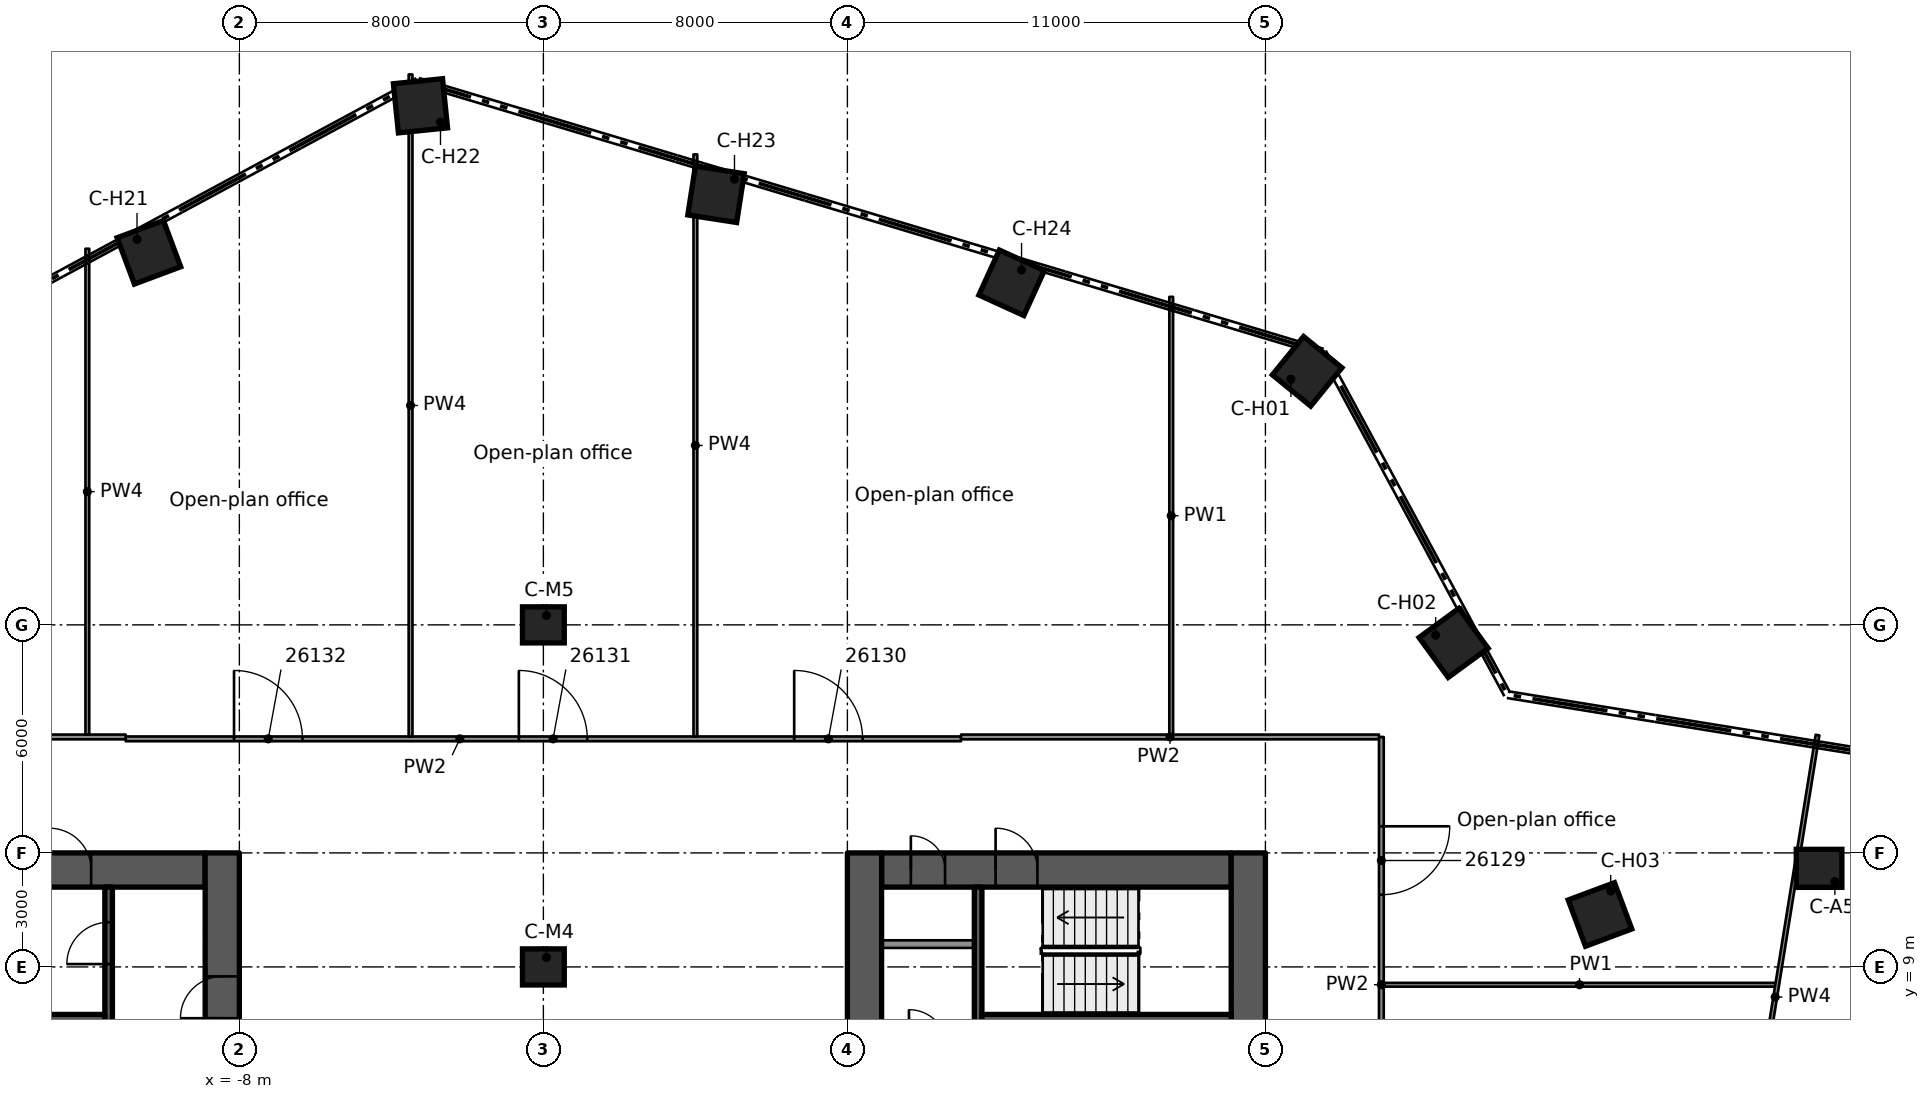
"""IFC4 building model, lengths in metres.
Left out: names, types, materials, properties, quantities, classifications, styles, units other than length and angle.
Written with IfcOpenShell. Run it as: python <this file> out.ifc"""

import sys

from ifc_helpers import new_model, si_unit, direction, frame, frame_2d, origin, origin_2d, place, context, subcontext, project, spatial, rectangle, extrude, element, fill, save


model = new_model("IFC4")
c1 = context("Model", 3, precision=1e-05, world=origin(), true_north=direction((0.0, 1.0)))
c2 = subcontext(c1, "Body", "Model", "MODEL_VIEW")
j1 = project(units=[si_unit("LENGTHUNIT", "METRE"), si_unit("PLANEANGLEUNIT", "RADIAN")], contexts=[c1])
p1 = place(None, origin())
s1 = spatial("IfcSite", under=j1, at=p1, CompositionType="ELEMENT")
p2 = place(p1, origin())
s2 = spatial("IfcBuilding", under=s1, at=p2, CompositionType="ELEMENT")
p3 = place(p2, frame((0.0, 0.0, 134.2)))
s3 = spatial("IfcBuildingStorey", under=s2, at=p3, CompositionType="ELEMENT", Elevation=134.2)
p4 = place(p3, frame((-18.1, 11.55, 0.0), z_axis=(0.0, 0.0, 1.0), x_axis=(1.0, 0.0, 0.0)))
e1 = element("IfcWall", 1, at=p4, inside=s3, PredefinedType="SHEAR", context=c2, shape_type="SweptSolid", body=[
    extrude(rectangle(XDim=9.2, YDim=0.9, at=frame_2d((4.6, 0.0))), origin(), (0.0, 0.0, 1.0), 3.5),
])
p5 = place(p4, frame((5.1, 0.0, 0.0)))
e2 = element("IfcOpeningElement", 2, at=p5, cuts=e1, PredefinedType="OPENING", context=c2, shape_type="SweptSolid", body=[
    extrude(rectangle(XDim=1.1, YDim=2.1, at=frame_2d((0.55, 1.05))), frame((0.0, 0.46, 0.0), z_axis=(0.0, -1.0, 0.0), x_axis=(1.0, 0.0, 0.0)), (0.0, 0.0, 1.0), 0.92),
])
p6 = place(p3, frame((-8.45, -12.0, 0.0), z_axis=(0.0, 0.0, 1.0), x_axis=(0.0, 1.0, 0.0)))
e3 = element("IfcWall", 3, at=p6, inside=s3, PredefinedType="SHEAR", context=c2, shape_type="SweptSolid", body=[
    extrude(rectangle(XDim=24.0, YDim=0.9, at=frame_2d((12.0, 0.0))), origin(), (0.0, 0.0, 1.0), 3.5),
])
p7 = place(p6, frame((9.6, 0.0, 0.0)))
e4 = element("IfcOpeningElement", 4, at=p7, cuts=e3, PredefinedType="OPENING", context=c2, shape_type="SweptSolid", body=[
    extrude(rectangle(XDim=1.8, YDim=2.1, at=frame_2d((0.9, 1.05))), frame((0.0, 0.46, 0.0), z_axis=(0.0, -1.0, 0.0), x_axis=(1.0, 0.0, 0.0)), (0.0, 0.0, 1.0), 0.92),
])
p8 = place(p6, frame((19.65, 0.0, 0.0)))
e5 = element("IfcOpeningElement", 5, at=p8, cuts=e3, PredefinedType="OPENING", context=c2, shape_type="SweptSolid", body=[
    extrude(rectangle(XDim=1.1, YDim=2.1, at=frame_2d((0.55, 1.05))), frame((0.0, 0.46, 0.0), z_axis=(0.0, -1.0, 0.0), x_axis=(1.0, 0.0, 0.0)), (0.0, 0.0, 1.0), 0.92),
])
p9 = place(p3, frame((8.9, 11.55, 0.0), z_axis=(0.0, 0.0, 1.0), x_axis=(1.0, 0.0, 0.0)))
e6 = element("IfcWall", 6, at=p9, inside=s3, PredefinedType="SHEAR", context=c2, shape_type="SweptSolid", body=[
    extrude(rectangle(XDim=9.2, YDim=0.9, at=frame_2d((4.6, 0.0))), origin(), (0.0, 0.0, 1.0), 3.5),
])
p10 = place(p9, frame((3.0, 0.0, 0.0)))
e7 = element("IfcOpeningElement", 7, at=p10, cuts=e6, PredefinedType="OPENING", context=c2, shape_type="SweptSolid", body=[
    extrude(rectangle(XDim=1.1, YDim=2.1, at=frame_2d((0.55, 1.05))), frame((0.0, 0.46, 0.0), z_axis=(0.0, -1.0, 0.0), x_axis=(1.0, 0.0, 0.0)), (0.0, 0.0, 1.0), 0.92),
])
p11 = place(p9, frame((0.77, 0.0, 0.0)))
e8 = element("IfcOpeningElement", 8, at=p11, cuts=e6, PredefinedType="OPENING", context=c2, shape_type="SweptSolid", body=[
    extrude(rectangle(XDim=0.9, YDim=2.1, at=frame_2d((0.45, 1.05))), frame((0.0, 0.46, 0.0), z_axis=(0.0, -1.0, 0.0), x_axis=(1.0, 0.0, 0.0)), (0.0, 0.0, 1.0), 0.92),
])
p12 = place(p3, frame((8.45, -12.0, 0.0), z_axis=(0.0, 0.0, 1.0), x_axis=(0.0, 1.0, 0.0)))
e9 = element("IfcWall", 9, at=p12, inside=s3, PredefinedType="SHEAR", context=c2, shape_type="SweptSolid", body=[
    extrude(rectangle(XDim=24.0, YDim=0.9, at=frame_2d((12.0, 0.0))), origin(), (0.0, 0.0, 1.0), 3.5),
])
p13 = place(p12, frame((12.6, 0.0, 0.0)))
e10 = element("IfcOpeningElement", 10, at=p13, cuts=e9, PredefinedType="OPENING", context=c2, shape_type="SweptSolid", body=[
    extrude(rectangle(XDim=1.8, YDim=2.1, at=frame_2d((0.9, 1.05))), frame((0.0, 0.46, 0.0), z_axis=(0.0, -1.0, 0.0), x_axis=(1.0, 0.0, 0.0)), (0.0, 0.0, 1.0), 0.92),
])
p14 = place(p12, frame((3.25, 0.0, 0.0)))
e11 = element("IfcOpeningElement", 11, at=p14, cuts=e9, PredefinedType="OPENING", context=c2, shape_type="SweptSolid", body=[
    extrude(rectangle(XDim=1.1, YDim=2.1, at=frame_2d((0.55, 1.05))), frame((0.0, 0.46, 0.0), z_axis=(0.0, -1.0, 0.0), x_axis=(1.0, 0.0, 0.0)), (0.0, 0.0, 1.0), 0.92),
])
p15 = place(p3, frame((18.55, -12.0, 0.0), z_axis=(0.0, 0.0, 1.0), x_axis=(0.0, 1.0, 0.0)))
e12 = element("IfcWall", 12, at=p15, inside=s3, PredefinedType="SHEAR", context=c2, shape_type="SweptSolid", body=[
    extrude(rectangle(XDim=24.0, YDim=0.9, at=frame_2d((12.0, 0.0))), origin(), (0.0, 0.0, 1.0), 3.5),
])
p16 = place(p15, frame((12.1, 0.0, 0.0)))
e13 = element("IfcOpeningElement", 13, at=p16, cuts=e12, PredefinedType="OPENING", context=c2, shape_type="SweptSolid", body=[
    extrude(rectangle(XDim=1.8, YDim=2.1, at=frame_2d((0.9, 1.05))), frame((0.0, 0.46, 0.0), z_axis=(0.0, -1.0, 0.0), x_axis=(1.0, 0.0, 0.0)), (0.0, 0.0, 1.0), 0.92),
])
p17 = place(p3, frame((33.569, 11.594, 0.0), z_axis=(0.0, 0.0, 1.0), x_axis=(1.0, 0.0, 0.0)))
e14 = element("IfcColumn", 14, at=p17, inside=s3, PredefinedType="COLUMN", context=c2, shape_type="SweptSolid", body=[
    extrude(rectangle(XDim=1.2, YDim=1.0, at=origin_2d()), origin(), (0.0, 0.0, 1.0), 3.5),
])
for number, where, z_axis, x_axis in (
    (15, (20.098, 24.672, 0.0), (0.0, 0.0, 1.0), (0.632, 0.775, 0.0)),
    (16, (23.951, 17.526, 0.0), (0.0, 0.0, 1.0), (0.807, 0.591, 0.0)),
    (17, (27.804, 10.38, 0.0), (0.0, 0.0, 1.0), (0.937, 0.35, 0.0)),
    (18, (-10.38, 27.804, 0.0), (0.0, 0.0, 1.0), (-0.35, 0.937, 0.0)),
    (19, (-3.234, 31.658, 0.0), (0.0, 0.0, 1.0), (-0.102, 0.995, 0.0)),
    (20, (4.543, 29.329, 0.0), (0.0, 0.0, 1.0), (0.153, 0.988, 0.0)),
    (21, (12.321, 27.001, 0.0), (0.0, 0.0, 1.0), (0.415, 0.91, 0.0)),
):
    element("IfcColumn", number, at=place(p3, frame(where, z_axis=z_axis, x_axis=x_axis)), inside=s3, PredefinedType="COLUMN", context=c2, shape_type="SweptSolid", body=[
        extrude(rectangle(XDim=1.3, YDim=1.3, at=origin_2d()), origin(), (0.0, 0.0, 1.0), 3.5),
    ])
for number, where, z_axis, x_axis in (
    (22, (0.0, 9.0, 0.0), (0.0, 0.0, 1.0), (1.0, 0.0, 0.0)),
    (23, (0.0, 18.0, 0.0), (0.0, 0.0, 1.0), (1.0, 0.0, 0.0)),
):
    element("IfcColumn", number, at=place(p3, frame(where, z_axis=z_axis, x_axis=x_axis)), inside=s3, PredefinedType="COLUMN", context=c2, shape_type="SweptSolid", body=[
        extrude(rectangle(XDim=1.1, YDim=0.95, at=origin_2d()), origin(), (0.0, 0.0, 1.0), 3.5),
    ])
p18 = place(p3, frame((-11.44, 6.975, 0.0), z_axis=(0.0, 0.0, 1.0), x_axis=(0.0, 1.0, 0.0)))
e24 = element("IfcWall", 24, at=p18, inside=s3, PredefinedType="SOLIDWALL", context=c2, shape_type="SweptSolid", body=[
    extrude(rectangle(XDim=4.125, YDim=0.2, at=frame_2d((2.062, 0.0))), origin(), (0.0, 0.0, 1.0), 3.09),
])
p19 = place(p18, frame((2.1, 0.0, 0.0)))
e25 = element("IfcOpeningElement", 25, at=p19, cuts=e24, PredefinedType="OPENING", context=c2, shape_type="SweptSolid", body=[
    extrude(rectangle(XDim=1.1, YDim=2.1, at=frame_2d((0.55, 1.05))), frame((0.0, 0.11, 0.0), z_axis=(0.0, -1.0, 0.0), x_axis=(1.0, 0.0, 0.0)), (0.0, 0.0, 1.0), 0.22),
])
p20 = place(p3, frame((-11.54, 7.65, 0.0), z_axis=(0.0, 0.0, 1.0), x_axis=(-1.0, 0.0, 0.0)))
e26 = element("IfcWall", 26, at=p20, inside=s3, PredefinedType="SOLIDWALL", context=c2, shape_type="SweptSolid", body=[
    extrude(rectangle(XDim=6.56, YDim=0.2, at=frame_2d((3.28, 0.0))), origin(), (0.0, 0.0, 1.0), 3.09),
])
p21 = place(p3, frame((11.44, 11.1, 0.0), z_axis=(0.0, 0.0, 1.0), x_axis=(0.0, -1.0, 0.0)))
e27 = element("IfcWall", 27, at=p21, inside=s3, PredefinedType="SOLIDWALL", context=c2, shape_type="SweptSolid", body=[
    extrude(rectangle(XDim=4.125, YDim=0.2, at=frame_2d((2.062, 0.0))), origin(), (0.0, 0.0, 1.0), 3.09),
])
p22 = place(p3, frame((11.54, 7.65, 0.0), z_axis=(0.0, 0.0, 1.0), x_axis=(1.0, 0.0, 0.0)))
e28 = element("IfcWall", 28, at=p22, inside=s3, PredefinedType="SOLIDWALL", context=c2, shape_type="SweptSolid", body=[
    extrude(rectangle(XDim=6.56, YDim=0.2, at=frame_2d((3.28, 0.0))), origin(), (0.0, 0.0, 1.0), 3.09),
])
p23 = place(p3, frame((8.9, 9.6, 0.0), z_axis=(0.0, 0.0, 1.0), x_axis=(1.0, 0.0, 0.0)))
e29 = element("IfcWall", 29, at=p23, inside=s3, PredefinedType="PARTITIONING", context=c2, shape_type="SweptSolid", body=[
    extrude(rectangle(XDim=2.44, YDim=0.2, at=frame_2d((1.22, 0.0))), origin(), (0.0, 0.0, 1.0), 3.09),
])
p24 = place(p3, frame((22.113, 8.531, 0.0), z_axis=(0.0, 0.0, 1.0), x_axis=(1.0, 0.0, 0.0)))
e30 = element("IfcWall", 30, at=p24, inside=s3, PredefinedType="PARTITIONING", context=c2, shape_type="SweptSolid", body=[
    extrude(rectangle(XDim=10.304, YDim=0.1, at=frame_2d((5.152, 0.0))), origin(), (0.0, 0.0, 1.0), 3.03),
])
p25 = place(p3, frame((-10.99, 15.001, 0.0), z_axis=(0.0, 0.0, 1.0), x_axis=(1.0, 0.0, 0.0)))
e31 = element("IfcWall", 31, at=p25, inside=s3, PredefinedType="PARTITIONING", context=c2, shape_type="SweptSolid", body=[
    extrude(rectangle(XDim=21.98, YDim=0.125, at=frame_2d((10.99, 0.0))), origin(), (0.0, 0.0, 1.0), 3.03),
])
p26 = place(p25, frame((17.59, 0.0, 0.0)))
e32 = element("IfcOpeningElement", 32, at=p26, cuts=e31, PredefinedType="OPENING", context=c2, shape_type="SweptSolid", body=[
    extrude(rectangle(XDim=1.8, YDim=2.1, at=frame_2d((0.9, 1.05))), frame((0.0, 0.073, 0.0), z_axis=(0.0, -1.0, 0.0), x_axis=(1.0, 0.0, 0.0)), (0.0, 0.0, 1.0), 0.145),
])
p27 = place(p25, frame((10.345, 0.0, 0.0)))
e33 = element("IfcOpeningElement", 33, at=p27, cuts=e31, PredefinedType="OPENING", context=c2, shape_type="SweptSolid", body=[
    extrude(rectangle(XDim=1.8, YDim=2.1, at=frame_2d((0.9, 1.05))), frame((0.0, 0.073, 0.0), z_axis=(0.0, -1.0, 0.0), x_axis=(1.0, 0.0, 0.0)), (0.0, 0.0, 1.0), 0.145),
])
p28 = place(p25, frame((2.85, 0.0, 0.0)))
e34 = element("IfcOpeningElement", 34, at=p28, cuts=e31, PredefinedType="OPENING", context=c2, shape_type="SweptSolid", body=[
    extrude(rectangle(XDim=1.8, YDim=2.1, at=frame_2d((0.9, 1.05))), frame((0.0, 0.073, 0.0), z_axis=(0.0, -1.0, 0.0), x_axis=(1.0, 0.0, 0.0)), (0.0, 0.0, 1.0), 0.145),
])
for number, where, z_axis, x_axis in (
    (35, (-21.988, 15.051, 0.0), (0.0, 0.0, 1.0), (1.0, 0.0, 0.0)),
    (36, (10.991, 15.051, 0.0), (0.0, 0.0, 1.0), (1.0, 0.0, 0.0)),
):
    element("IfcWall", number, at=place(p3, frame(where, z_axis=z_axis, x_axis=x_axis)), inside=s3, PredefinedType="PARTITIONING", context=c2, shape_type="SweptSolid", body=[
        extrude(rectangle(XDim=10.997, YDim=0.125, at=frame_2d((5.499, 0.0))), origin(), (0.0, 0.0, 1.0), 3.03),
    ])
p29 = place(p3, frame((31.302, 1.314, 0.0), z_axis=(0.0, 0.0, 1.0), x_axis=(0.159396223654, 0.987214689865, 0.0)))
e37 = element("IfcWall", 37, at=p29, inside=s3, PredefinedType="PARTITIONING", context=c2, shape_type="SweptSolid", body=[
    extrude(rectangle(XDim=13.966, YDim=0.1, at=frame_2d((6.983, 0.0))), origin(), (0.0, 0.0, 1.0), 2.395),
])
p30 = place(p3, frame((22.051, 15.05, 0.0), z_axis=(0.0, 0.0, 1.0), x_axis=(0.0, -1.0, 0.0)))
e38 = element("IfcWall", 38, at=p30, inside=s3, PredefinedType="PARTITIONING", context=c2, shape_type="SweptSolid", body=[
    extrude(rectangle(XDim=13.036, YDim=0.125, at=frame_2d((6.518, 0.0))), origin(), (0.0, 0.0, 1.0), 3.03),
])
p31 = place(p30, frame((2.35, 0.0, 0.0)))
e39 = element("IfcOpeningElement", 39, at=p31, cuts=e38, PredefinedType="OPENING", context=c2, shape_type="SweptSolid", body=[
    extrude(rectangle(XDim=1.8, YDim=2.1, at=frame_2d((0.9, 1.05))), frame((0.0, 0.073, 0.0), z_axis=(0.0, -1.0, 0.0), x_axis=(1.0, 0.0, 0.0)), (0.0, 0.0, 1.0), 0.145),
])
p32 = place(p3, frame((16.521, 15.114, 0.0), z_axis=(0.0, 0.0, 1.0), x_axis=(0.0, 1.0, 0.0)))
e40 = element("IfcWall", 40, at=p32, inside=s3, PredefinedType="PARTITIONING", context=c2, shape_type="SweptSolid", body=[
    extrude(rectangle(XDim=11.517, YDim=0.1, at=frame_2d((5.759, 0.0))), origin(), (0.0, 0.0, 1.0), 3.03),
])
p33 = place(p3, frame((4.0, 15.063, 0.0), z_axis=(0.0, 0.0, 1.0), x_axis=(0.0, 1.0, 0.0)))
e41 = element("IfcWall", 41, at=p33, inside=s3, PredefinedType="PARTITIONING", context=c2, shape_type="SweptSolid", body=[
    extrude(rectangle(XDim=15.316, YDim=0.1, at=frame_2d((7.658, 0.0))), origin(), (0.0, 0.0, 1.0), 2.395),
])
p34 = place(p3, frame((-3.495, 15.063, 0.0), z_axis=(0.0, 0.0, 1.0), x_axis=(0.0, 1.0, 0.0)))
e42 = element("IfcWall", 42, at=p34, inside=s3, PredefinedType="PARTITIONING", context=c2, shape_type="SweptSolid", body=[
    extrude(rectangle(XDim=17.42, YDim=0.1, at=frame_2d((8.71, 0.0))), origin(), (0.0, 0.0, 1.0), 2.395),
])
p35 = place(p3, frame((-12.0, 15.114, 0.0), z_axis=(0.0, 0.0, 1.0), x_axis=(0.0, 1.0, 0.0)))
e43 = element("IfcWall", 43, at=p35, inside=s3, PredefinedType="PARTITIONING", context=c2, shape_type="SweptSolid", body=[
    extrude(rectangle(XDim=12.783, YDim=0.1, at=frame_2d((6.392, 0.0))), origin(), (0.0, 0.0, 1.0), 2.395),
])
p36 = place(p8, origin())
e44 = element("IfcDoor", 44, at=p36, inside=s3, OperationType="SINGLE_SWING_RIGHT", PredefinedType="DOOR", context=c2, shape_type="SweptSolid", body=[
    extrude(rectangle(XDim=1.1, YDim=2.1, at=frame_2d((0.55, 1.05))), frame((0.0, 0.025, 0.0), z_axis=(0.0, -1.0, 0.0), x_axis=(1.0, 0.0, 0.0)), (0.0, 0.0, 1.0), 0.05),
])
fill(e5, e44)
p37 = place(p5, origin())
e45 = element("IfcDoor", 45, at=p37, inside=s3, OperationType="SINGLE_SWING_RIGHT", PredefinedType="DOOR", context=c2, shape_type="SweptSolid", body=[
    extrude(rectangle(XDim=1.1, YDim=2.1, at=frame_2d((0.55, 1.05))), frame((0.0, 0.025, 0.0), z_axis=(0.0, -1.0, 0.0), x_axis=(1.0, 0.0, 0.0)), (0.0, 0.0, 1.0), 0.05),
])
fill(e2, e45)
p38 = place(p19, origin())
e46 = element("IfcDoor", 46, at=p38, inside=s3, OperationType="SINGLE_SWING_RIGHT", PredefinedType="DOOR", context=c2, shape_type="SweptSolid", body=[
    extrude(rectangle(XDim=1.1, YDim=2.1, at=frame_2d((0.55, 1.05))), frame((0.0, 0.025, 0.0), z_axis=(0.0, -1.0, 0.0), x_axis=(1.0, 0.0, 0.0)), (0.0, 0.0, 1.0), 0.05),
])
fill(e25, e46)
p39 = place(p10, origin())
e47 = element("IfcDoor", 47, at=p39, inside=s3, OperationType="SINGLE_SWING_LEFT", PredefinedType="DOOR", context=c2, shape_type="SweptSolid", body=[
    extrude(rectangle(XDim=1.1, YDim=2.1, at=frame_2d((0.55, 1.05))), frame((0.0, 0.025, 0.0), z_axis=(0.0, -1.0, 0.0), x_axis=(1.0, 0.0, 0.0)), (0.0, 0.0, 1.0), 0.05),
])
fill(e7, e47)
p40 = place(p11, origin())
e48 = element("IfcDoor", 48, at=p40, inside=s3, OperationType="SINGLE_SWING_LEFT", PredefinedType="DOOR", context=c2, shape_type="SweptSolid", body=[
    extrude(rectangle(XDim=0.9, YDim=2.1, at=frame_2d((0.45, 1.05))), frame((0.0, 0.025, 0.0), z_axis=(0.0, -1.0, 0.0), x_axis=(1.0, 0.0, 0.0)), (0.0, 0.0, 1.0), 0.05),
])
fill(e8, e48)
p41 = place(p31, origin())
e49 = element("IfcDoor", 49, at=p41, inside=s3, OperationType="DOUBLE_DOOR_SINGLE_SWING", PredefinedType="DOOR", context=c2, shape_type="SweptSolid", body=[
    extrude(rectangle(XDim=1.8, YDim=2.1, at=frame_2d((0.9, 1.05))), frame((0.0, 0.025, 0.0), z_axis=(0.0, -1.0, 0.0), x_axis=(1.0, 0.0, 0.0)), (0.0, 0.0, 1.0), 0.05),
])
fill(e39, e49)
p42 = place(p26, origin())
e50 = element("IfcDoor", 50, at=p42, inside=s3, OperationType="DOUBLE_DOOR_SINGLE_SWING", PredefinedType="DOOR", context=c2, shape_type="SweptSolid", body=[
    extrude(rectangle(XDim=1.8, YDim=2.1, at=frame_2d((0.9, 1.05))), frame((0.0, 0.025, 0.0), z_axis=(0.0, -1.0, 0.0), x_axis=(1.0, 0.0, 0.0)), (0.0, 0.0, 1.0), 0.05),
])
fill(e32, e50)
p43 = place(p27, origin())
e51 = element("IfcDoor", 51, at=p43, inside=s3, OperationType="DOUBLE_DOOR_SINGLE_SWING", PredefinedType="DOOR", context=c2, shape_type="SweptSolid", body=[
    extrude(rectangle(XDim=1.8, YDim=2.1, at=frame_2d((0.9, 1.05))), frame((0.0, 0.025, 0.0), z_axis=(0.0, -1.0, 0.0), x_axis=(1.0, 0.0, 0.0)), (0.0, 0.0, 1.0), 0.05),
])
fill(e33, e51)
p44 = place(p28, origin())
e52 = element("IfcDoor", 52, at=p44, inside=s3, OperationType="DOUBLE_DOOR_SINGLE_SWING", PredefinedType="DOOR", context=c2, shape_type="SweptSolid", body=[
    extrude(rectangle(XDim=1.8, YDim=2.1, at=frame_2d((0.9, 1.05))), frame((0.0, 0.025, 0.0), z_axis=(0.0, -1.0, 0.0), x_axis=(1.0, 0.0, 0.0)), (0.0, 0.0, 1.0), 0.05),
])
fill(e34, e52)
save(model, sys.argv[1])
